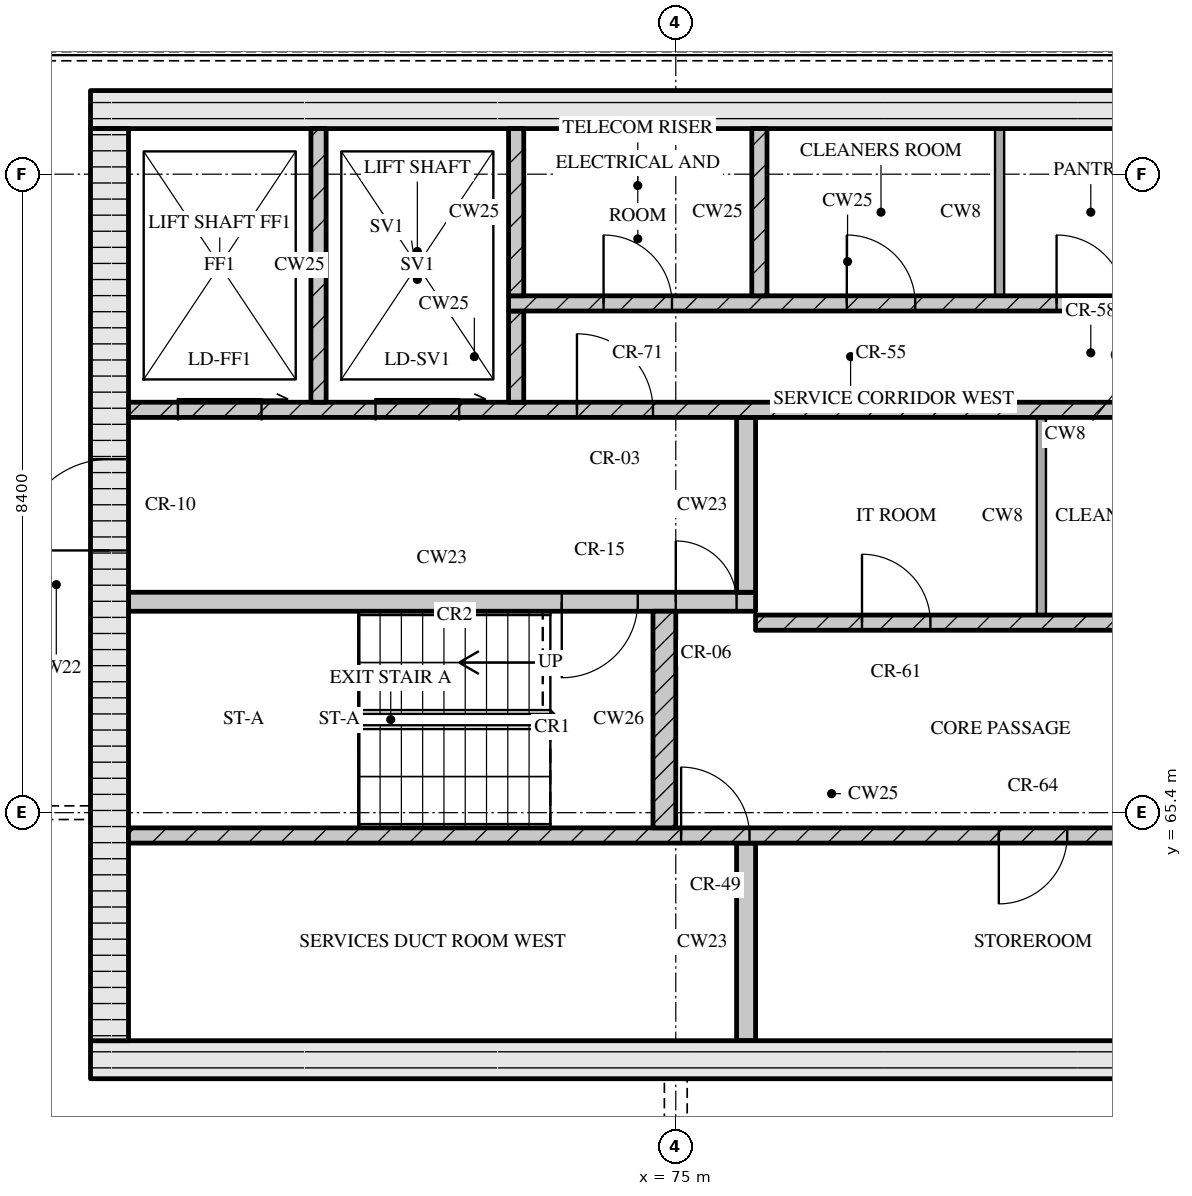
"""IFC4 building model, lengths in metres.
Left out: names, types, materials, properties, quantities, classifications, styles, units other than length and angle.
Written with IfcOpenShell. Run it as: python <this file> out.ifc"""

import sys

from ifc_helpers import new_model, si_unit, direction, frame, frame_2d, origin, place, context, subcontext, project, spatial, rectangle, extrude, element, fill, save


model = new_model("IFC4")
c1 = context("Model", 3, precision=1e-05, world=origin(), true_north=direction((0.0, 1.0)))
c2 = subcontext(c1, "Body", "Model", "MODEL_VIEW")
j1 = project(units=[si_unit("LENGTHUNIT", "METRE"), si_unit("PLANEANGLEUNIT", "RADIAN")], contexts=[c1])
p1 = place(None, origin())
s1 = spatial("IfcSite", under=j1, at=p1, CompositionType="ELEMENT")
p2 = place(p1, origin())
s2 = spatial("IfcBuilding", under=s1, at=p2, CompositionType="ELEMENT")
p3 = place(p2, frame((0.0, 0.0, 306.75)))
s3 = spatial("IfcBuildingStorey", under=s2, at=p3, CompositionType="ELEMENT", Elevation=306.75)
p4 = place(p3, frame((67.3, 62.15, 0.0), z_axis=(0.0, 0.0, 1.0), x_axis=(1.0, 0.0, 0.0)))
e1 = element("IfcWall", 1, at=p4, inside=s3, PredefinedType="SOLIDWALL", context=c2, shape_type="SweptSolid", body=[
    extrude(rectangle(XDim=40.6, YDim=0.5, at=frame_2d((20.3, 0.0))), origin(), (0.0, 0.0, 1.0), 3.3),
])
p5 = place(p4, frame((20.65, 0.0, 0.0)))
e2 = element("IfcOpeningElement", 2, at=p5, cuts=e1, PredefinedType="OPENING", context=c2, shape_type="SweptSolid", body=[
    extrude(rectangle(XDim=1.8, YDim=2.1, at=frame_2d((0.9, 1.05))), frame((0.0, 0.26, 0.0), z_axis=(0.0, -1.0, 0.0), x_axis=(1.0, 0.0, 0.0)), (0.0, 0.0, 1.0), 0.52),
])
p6 = place(p3, frame((67.3, 74.65, 0.0), z_axis=(0.0, 0.0, 1.0), x_axis=(1.0, 0.0, 0.0)))
e3 = element("IfcWall", 3, at=p6, inside=s3, PredefinedType="SOLIDWALL", context=c2, shape_type="SweptSolid", body=[
    extrude(rectangle(XDim=40.6, YDim=0.5, at=frame_2d((20.3, 0.0))), origin(), (0.0, 0.0, 1.0), 3.3),
])
p7 = place(p3, frame((67.55, 62.4, 0.0), z_axis=(0.0, 0.0, 1.0), x_axis=(0.0, 1.0, 0.0)))
e4 = element("IfcWall", 4, at=p7, inside=s3, PredefinedType="SOLIDWALL", context=c2, shape_type="SweptSolid", body=[
    extrude(rectangle(XDim=12.0, YDim=0.5, at=frame_2d((6.0, 0.0))), origin(), (0.0, 0.0, 1.0), 3.3),
])
p8 = place(p7, frame((6.45, 0.0, 0.0)))
e5 = element("IfcOpeningElement", 5, at=p8, cuts=e4, PredefinedType="OPENING", context=c2, shape_type="SweptSolid", body=[
    extrude(rectangle(XDim=1.2, YDim=2.1, at=frame_2d((0.6, 1.05))), frame((0.0, 0.26, 0.0), z_axis=(0.0, -1.0, 0.0), x_axis=(1.0, 0.0, 0.0)), (0.0, 0.0, 1.0), 0.52),
])
p9 = place(p3, frame((75.925, 62.4, 0.0), z_axis=(0.0, 0.0, 1.0), x_axis=(0.0, 1.0, 0.0)))
e6 = element("IfcWall", 6, at=p9, inside=s3, PredefinedType="SOLIDWALL", context=c2, shape_type="SweptSolid", body=[
    extrude(rectangle(XDim=2.6, YDim=0.25, at=frame_2d((1.3, 0.0))), origin(), (0.0, 0.0, 1.0), 3.3),
])
p10 = place(p3, frame((67.8, 65.1, 0.0), z_axis=(0.0, 0.0, 1.0), x_axis=(1.0, 0.0, 0.0)))
e7 = element("IfcWall", 7, at=p10, inside=s3, PredefinedType="SOLIDWALL", context=c2, shape_type="SweptSolid", body=[
    extrude(rectangle(XDim=18.5, YDim=0.2, at=frame_2d((9.25, 0.0))), origin(), (0.0, 0.0, 1.0), 3.3),
])
p11 = place(p10, frame((7.27, 0.0, 0.0)))
e8 = element("IfcOpeningElement", 8, at=p11, cuts=e7, PredefinedType="OPENING", context=c2, shape_type="SweptSolid", body=[
    extrude(rectangle(XDim=0.9, YDim=2.1, at=frame_2d((0.45, 1.05))), frame((0.0, 0.11, 0.0), z_axis=(0.0, -1.0, 0.0), x_axis=(1.0, 0.0, 0.0)), (0.0, 0.0, 1.0), 0.22),
])
p12 = place(p10, frame((11.45, 0.0, 0.0)))
e9 = element("IfcOpeningElement", 9, at=p12, cuts=e7, PredefinedType="OPENING", context=c2, shape_type="SweptSolid", body=[
    extrude(rectangle(XDim=0.9, YDim=2.1, at=frame_2d((0.45, 1.05))), frame((0.0, 0.11, 0.0), z_axis=(0.0, -1.0, 0.0), x_axis=(1.0, 0.0, 0.0)), (0.0, 0.0, 1.0), 0.22),
])
p13 = place(p10, frame((16.7, 0.0, 0.0)))
e10 = element("IfcOpeningElement", 10, at=p13, cuts=e7, PredefinedType="OPENING", context=c2, shape_type="SweptSolid", body=[
    extrude(rectangle(XDim=0.9, YDim=2.1, at=frame_2d((0.45, 1.05))), frame((0.0, 0.11, 0.0), z_axis=(0.0, -1.0, 0.0), x_axis=(1.0, 0.0, 0.0)), (0.0, 0.0, 1.0), 0.22),
])
p14 = place(p3, frame((74.85, 65.2, 0.0), z_axis=(0.0, 0.0, 1.0), x_axis=(0.0, 1.0, 0.0)))
e11 = element("IfcWall", 11, at=p14, inside=s3, PredefinedType="SOLIDWALL", context=c2, shape_type="SweptSolid", body=[
    extrude(rectangle(XDim=2.85, YDim=0.3, at=frame_2d((1.425, 0.0))), origin(), (0.0, 0.0, 1.0), 3.3),
])
p15 = place(p3, frame((76.05, 67.9, 0.0), z_axis=(0.0, 0.0, 1.0), x_axis=(1.0, 0.0, 0.0)))
e12 = element("IfcWall", 12, at=p15, inside=s3, PredefinedType="SOLIDWALL", context=c2, shape_type="SweptSolid", body=[
    extrude(rectangle(XDim=23.1, YDim=0.2, at=frame_2d((11.55, 0.0))), origin(), (0.0, 0.0, 1.0), 3.3),
])
p16 = place(p15, frame((1.4, 0.0, 0.0)))
e13 = element("IfcOpeningElement", 13, at=p16, cuts=e12, PredefinedType="OPENING", context=c2, shape_type="SweptSolid", body=[
    extrude(rectangle(XDim=0.9, YDim=2.1, at=frame_2d((0.45, 1.05))), frame((0.0, 0.11, 0.0), z_axis=(0.0, -1.0, 0.0), x_axis=(1.0, 0.0, 0.0)), (0.0, 0.0, 1.0), 0.22),
])
p17 = place(p15, frame((5.11, 0.0, 0.0)))
e14 = element("IfcOpeningElement", 14, at=p17, cuts=e12, PredefinedType="OPENING", context=c2, shape_type="SweptSolid", body=[
    extrude(rectangle(XDim=0.9, YDim=2.1, at=frame_2d((0.45, 1.05))), frame((0.0, 0.11, 0.0), z_axis=(0.0, -1.0, 0.0), x_axis=(1.0, 0.0, 0.0)), (0.0, 0.0, 1.0), 0.22),
])
p18 = place(p15, frame((8.45, 0.0, 0.0)))
e15 = element("IfcOpeningElement", 15, at=p18, cuts=e12, PredefinedType="OPENING", context=c2, shape_type="SweptSolid", body=[
    extrude(rectangle(XDim=0.9, YDim=2.1, at=frame_2d((0.45, 1.05))), frame((0.0, 0.11, 0.0), z_axis=(0.0, -1.0, 0.0), x_axis=(1.0, 0.0, 0.0)), (0.0, 0.0, 1.0), 0.22),
])
p19 = place(p15, frame((10.91, 0.0, 0.0)))
e16 = element("IfcOpeningElement", 16, at=p19, cuts=e12, PredefinedType="OPENING", context=c2, shape_type="SweptSolid", body=[
    extrude(rectangle(XDim=0.9, YDim=2.1, at=frame_2d((0.45, 1.05))), frame((0.0, 0.11, 0.0), z_axis=(0.0, -1.0, 0.0), x_axis=(1.0, 0.0, 0.0)), (0.0, 0.0, 1.0), 0.22),
])
p20 = place(p15, frame((13.55, 0.0, 0.0)))
e17 = element("IfcOpeningElement", 17, at=p20, cuts=e12, PredefinedType="OPENING", context=c2, shape_type="SweptSolid", body=[
    extrude(rectangle(XDim=1.0, YDim=2.1, at=frame_2d((0.5, 1.05))), frame((0.0, 0.11, 0.0), z_axis=(0.0, -1.0, 0.0), x_axis=(1.0, 0.0, 0.0)), (0.0, 0.0, 1.0), 0.22),
])
p21 = place(p15, frame((16.2, 0.0, 0.0)))
e18 = element("IfcOpeningElement", 18, at=p21, cuts=e12, PredefinedType="OPENING", context=c2, shape_type="SweptSolid", body=[
    extrude(rectangle(XDim=1.1, YDim=2.1, at=frame_2d((0.55, 1.05))), frame((0.0, 0.11, 0.0), z_axis=(0.0, -1.0, 0.0), x_axis=(1.0, 0.0, 0.0)), (0.0, 0.0, 1.0), 0.22),
])
p22 = place(p15, frame((18.7, 0.0, 0.0)))
e19 = element("IfcOpeningElement", 19, at=p22, cuts=e12, PredefinedType="OPENING", context=c2, shape_type="SweptSolid", body=[
    extrude(rectangle(XDim=1.1, YDim=2.1, at=frame_2d((0.55, 1.05))), frame((0.0, 0.11, 0.0), z_axis=(0.0, -1.0, 0.0), x_axis=(1.0, 0.0, 0.0)), (0.0, 0.0, 1.0), 0.22),
])
p23 = place(p15, frame((21.2, 0.0, 0.0)))
e20 = element("IfcOpeningElement", 20, at=p23, cuts=e12, PredefinedType="OPENING", context=c2, shape_type="SweptSolid", body=[
    extrude(rectangle(XDim=1.1, YDim=2.1, at=frame_2d((0.55, 1.05))), frame((0.0, 0.11, 0.0), z_axis=(0.0, -1.0, 0.0), x_axis=(1.0, 0.0, 0.0)), (0.0, 0.0, 1.0), 0.22),
])
p24 = place(p3, frame((79.81, 68.0, 0.0), z_axis=(0.0, 0.0, 1.0), x_axis=(0.0, 1.0, 0.0)))
e21 = element("IfcWall", 21, at=p24, inside=s3, PredefinedType="PARTITIONING", context=c2, shape_type="SweptSolid", body=[
    extrude(rectangle(XDim=2.6, YDim=0.12, at=frame_2d((1.3, 0.0))), origin(), (0.0, 0.0, 1.0), 3.3),
])
p25 = place(p3, frame((67.8, 68.175, 0.0), z_axis=(0.0, 0.0, 1.0), x_axis=(1.0, 0.0, 0.0)))
e22 = element("IfcWall", 22, at=p25, inside=s3, PredefinedType="SOLIDWALL", context=c2, shape_type="SweptSolid", body=[
    extrude(rectangle(XDim=8.25, YDim=0.25, at=frame_2d((4.125, 0.0))), origin(), (0.0, 0.0, 1.0), 3.3),
])
p26 = place(p25, frame((5.7, 0.0, 0.0)))
e23 = element("IfcOpeningElement", 23, at=p26, cuts=e22, PredefinedType="OPENING", context=c2, shape_type="SweptSolid", body=[
    extrude(rectangle(XDim=1.0, YDim=2.1, at=frame_2d((0.5, 1.05))), frame((0.0, 0.135, 0.0), z_axis=(0.0, -1.0, 0.0), x_axis=(1.0, 0.0, 0.0)), (0.0, 0.0, 1.0), 0.27),
])
p27 = place(p25, frame((7.2, 0.0, 0.0)))
e24 = element("IfcOpeningElement", 24, at=p27, cuts=e22, PredefinedType="OPENING", context=c2, shape_type="SweptSolid", body=[
    extrude(rectangle(XDim=0.8, YDim=2.1, at=frame_2d((0.4, 1.05))), frame((0.0, 0.135, 0.0), z_axis=(0.0, -1.0, 0.0), x_axis=(1.0, 0.0, 0.0)), (0.0, 0.0, 1.0), 0.27),
])
p28 = place(p3, frame((75.925, 68.3, 0.0), z_axis=(0.0, 0.0, 1.0), x_axis=(0.0, 1.0, 0.0)))
e25 = element("IfcWall", 25, at=p28, inside=s3, PredefinedType="SOLIDWALL", context=c2, shape_type="SweptSolid", body=[
    extrude(rectangle(XDim=2.3, YDim=0.25, at=frame_2d((1.15, 0.0))), origin(), (0.0, 0.0, 1.0), 3.3),
])
p29 = place(p3, frame((67.8, 70.7, 0.0), z_axis=(0.0, 0.0, 1.0), x_axis=(1.0, 0.0, 0.0)))
e26 = element("IfcWall", 26, at=p29, inside=s3, PredefinedType="SOLIDWALL", context=c2, shape_type="SweptSolid", body=[
    extrude(rectangle(XDim=39.6, YDim=0.2, at=frame_2d((19.8, 0.0))), origin(), (0.0, 0.0, 1.0), 3.3),
])
p30 = place(p29, frame((0.65, 0.0, 0.0)))
e27 = element("IfcOpeningElement", 27, at=p30, cuts=e26, PredefinedType="OPENING", context=c2, shape_type="SweptSolid", body=[
    extrude(rectangle(XDim=1.1, YDim=2.1, at=frame_2d((0.55, 1.05))), frame((0.0, 0.11, 0.0), z_axis=(0.0, -1.0, 0.0), x_axis=(1.0, 0.0, 0.0)), (0.0, 0.0, 1.0), 0.22),
])
p31 = place(p29, frame((3.25, 0.0, 0.0)))
e28 = element("IfcOpeningElement", 28, at=p31, cuts=e26, PredefinedType="OPENING", context=c2, shape_type="SweptSolid", body=[
    extrude(rectangle(XDim=1.1, YDim=2.1, at=frame_2d((0.55, 1.05))), frame((0.0, 0.11, 0.0), z_axis=(0.0, -1.0, 0.0), x_axis=(1.0, 0.0, 0.0)), (0.0, 0.0, 1.0), 0.22),
])
p32 = place(p29, frame((5.9, 0.0, 0.0)))
e29 = element("IfcOpeningElement", 29, at=p32, cuts=e26, PredefinedType="OPENING", context=c2, shape_type="SweptSolid", body=[
    extrude(rectangle(XDim=1.0, YDim=2.1, at=frame_2d((0.5, 1.05))), frame((0.0, 0.11, 0.0), z_axis=(0.0, -1.0, 0.0), x_axis=(1.0, 0.0, 0.0)), (0.0, 0.0, 1.0), 0.22),
])
p33 = place(p29, frame((21.7, 0.0, 0.0)))
e30 = element("IfcOpeningElement", 30, at=p33, cuts=e26, PredefinedType="OPENING", context=c2, shape_type="SweptSolid", body=[
    extrude(rectangle(XDim=1.0, YDim=2.1, at=frame_2d((0.5, 1.05))), frame((0.0, 0.11, 0.0), z_axis=(0.0, -1.0, 0.0), x_axis=(1.0, 0.0, 0.0)), (0.0, 0.0, 1.0), 0.22),
])
p34 = place(p29, frame((32.7, 0.0, 0.0)))
e31 = element("IfcOpeningElement", 31, at=p34, cuts=e26, PredefinedType="OPENING", context=c2, shape_type="SweptSolid", body=[
    extrude(rectangle(XDim=1.0, YDim=2.1, at=frame_2d((0.5, 1.05))), frame((0.0, 0.11, 0.0), z_axis=(0.0, -1.0, 0.0), x_axis=(1.0, 0.0, 0.0)), (0.0, 0.0, 1.0), 0.22),
])
p35 = place(p29, frame((35.25, 0.0, 0.0)))
e32 = element("IfcOpeningElement", 32, at=p35, cuts=e26, PredefinedType="OPENING", context=c2, shape_type="SweptSolid", body=[
    extrude(rectangle(XDim=1.1, YDim=2.1, at=frame_2d((0.55, 1.05))), frame((0.0, 0.11, 0.0), z_axis=(0.0, -1.0, 0.0), x_axis=(1.0, 0.0, 0.0)), (0.0, 0.0, 1.0), 0.22),
])
p36 = place(p29, frame((37.85, 0.0, 0.0)))
e33 = element("IfcOpeningElement", 33, at=p36, cuts=e26, PredefinedType="OPENING", context=c2, shape_type="SweptSolid", body=[
    extrude(rectangle(XDim=1.1, YDim=2.1, at=frame_2d((0.55, 1.05))), frame((0.0, 0.11, 0.0), z_axis=(0.0, -1.0, 0.0), x_axis=(1.0, 0.0, 0.0)), (0.0, 0.0, 1.0), 0.22),
])
p37 = place(p3, frame((70.3, 70.8, 0.0), z_axis=(0.0, 0.0, 1.0), x_axis=(0.0, 1.0, 0.0)))
e34 = element("IfcWall", 34, at=p37, inside=s3, PredefinedType="SOLIDWALL", context=c2, shape_type="SweptSolid", body=[
    extrude(rectangle(XDim=3.6, YDim=0.2, at=frame_2d((1.8, 0.0))), origin(), (0.0, 0.0, 1.0), 3.3),
])
p38 = place(p3, frame((72.9, 70.8, 0.0), z_axis=(0.0, 0.0, 1.0), x_axis=(0.0, 1.0, 0.0)))
e35 = element("IfcWall", 35, at=p38, inside=s3, PredefinedType="SOLIDWALL", context=c2, shape_type="SweptSolid", body=[
    extrude(rectangle(XDim=1.2, YDim=0.2, at=frame_2d((0.6, 0.0))), origin(), (0.0, 0.0, 1.0), 3.3),
])
p39 = place(p3, frame((72.8, 72.1, 0.0), z_axis=(0.0, 0.0, 1.0), x_axis=(1.0, 0.0, 0.0)))
e36 = element("IfcWall", 36, at=p39, inside=s3, PredefinedType="SOLIDWALL", context=c2, shape_type="SweptSolid", body=[
    extrude(rectangle(XDim=8.92, YDim=0.2, at=frame_2d((4.46, 0.0))), origin(), (0.0, 0.0, 1.0), 3.3),
])
p40 = place(p39, frame((1.25, 0.0, 0.0)))
e37 = element("IfcOpeningElement", 37, at=p40, cuts=e36, PredefinedType="OPENING", context=c2, shape_type="SweptSolid", body=[
    extrude(rectangle(XDim=0.9, YDim=2.1, at=frame_2d((0.45, 1.05))), frame((0.0, 0.11, 0.0), z_axis=(0.0, -1.0, 0.0), x_axis=(1.0, 0.0, 0.0)), (0.0, 0.0, 1.0), 0.22),
])
p41 = place(p39, frame((4.45, 0.0, 0.0)))
e38 = element("IfcOpeningElement", 38, at=p41, cuts=e36, PredefinedType="OPENING", context=c2, shape_type="SweptSolid", body=[
    extrude(rectangle(XDim=0.9, YDim=2.1, at=frame_2d((0.45, 1.05))), frame((0.0, 0.11, 0.0), z_axis=(0.0, -1.0, 0.0), x_axis=(1.0, 0.0, 0.0)), (0.0, 0.0, 1.0), 0.22),
])
p42 = place(p39, frame((7.21, 0.0, 0.0)))
e39 = element("IfcOpeningElement", 39, at=p42, cuts=e36, PredefinedType="OPENING", context=c2, shape_type="SweptSolid", body=[
    extrude(rectangle(XDim=0.9, YDim=2.1, at=frame_2d((0.45, 1.05))), frame((0.0, 0.11, 0.0), z_axis=(0.0, -1.0, 0.0), x_axis=(1.0, 0.0, 0.0)), (0.0, 0.0, 1.0), 0.22),
])
for number, where, z_axis, x_axis in (
    (40, (72.9, 72.2, 0.0), (0.0, 0.0, 1.0), (0.0, 1.0, 0.0)),
    (41, (76.1, 72.2, 0.0), (0.0, 0.0, 1.0), (0.0, 1.0, 0.0)),
):
    element("IfcWall", number, at=place(p3, frame(where, z_axis=z_axis, x_axis=x_axis)), inside=s3, PredefinedType="SOLIDWALL", context=c2, shape_type="SweptSolid", body=[
        extrude(rectangle(XDim=2.2, YDim=0.2, at=frame_2d((1.1, 0.0))), origin(), (0.0, 0.0, 1.0), 3.3),
    ])
p43 = place(p3, frame((79.26, 72.2, 0.0), z_axis=(0.0, 0.0, 1.0), x_axis=(0.0, 1.0, 0.0)))
e42 = element("IfcWall", 42, at=p43, inside=s3, PredefinedType="PARTITIONING", context=c2, shape_type="SweptSolid", body=[
    extrude(rectangle(XDim=2.2, YDim=0.12, at=frame_2d((1.1, 0.0))), origin(), (0.0, 0.0, 1.0), 3.3),
])
p44 = place(p11, origin())
e43 = element("IfcDoor", 43, at=p44, inside=s3, OperationType="SINGLE_SWING_LEFT", PredefinedType="DOOR", context=c2, shape_type="SweptSolid", body=[
    extrude(rectangle(XDim=0.9, YDim=2.1, at=frame_2d((0.45, 1.05))), frame((0.0, 0.025, 0.0), z_axis=(0.0, -1.0, 0.0), x_axis=(1.0, 0.0, 0.0)), (0.0, 0.0, 1.0), 0.05),
])
fill(e8, e43)
p45 = place(p12, origin())
e44 = element("IfcDoor", 44, at=p45, inside=s3, OperationType="SINGLE_SWING_RIGHT", PredefinedType="DOOR", context=c2, shape_type="SweptSolid", body=[
    extrude(rectangle(XDim=0.9, YDim=2.1, at=frame_2d((0.45, 1.05))), frame((0.0, 0.025, 0.0), z_axis=(0.0, -1.0, 0.0), x_axis=(1.0, 0.0, 0.0)), (0.0, 0.0, 1.0), 0.05),
])
fill(e9, e44)
p46 = place(p16, origin())
e45 = element("IfcDoor", 45, at=p46, inside=s3, OperationType="SINGLE_SWING_LEFT", PredefinedType="DOOR", context=c2, shape_type="SweptSolid", body=[
    extrude(rectangle(XDim=0.9, YDim=2.1, at=frame_2d((0.45, 1.05))), frame((0.0, 0.025, 0.0), z_axis=(0.0, -1.0, 0.0), x_axis=(1.0, 0.0, 0.0)), (0.0, 0.0, 1.0), 0.05),
])
fill(e13, e45)
p47 = place(p26, origin())
e46 = element("IfcDoor", 46, at=p47, inside=s3, OperationType="SINGLE_SWING_RIGHT", PredefinedType="DOOR", context=c2, shape_type="SweptSolid", body=[
    extrude(rectangle(XDim=1.0, YDim=2.1, at=frame_2d((0.5, 1.05))), frame((0.0, 0.025, 0.0), z_axis=(0.0, -1.0, 0.0), x_axis=(1.0, 0.0, 0.0)), (0.0, 0.0, 1.0), 0.05),
])
fill(e23, e46)
p48 = place(p27, origin())
e47 = element("IfcDoor", 47, at=p48, inside=s3, OperationType="SINGLE_SWING_LEFT", PredefinedType="DOOR", context=c2, shape_type="SweptSolid", body=[
    extrude(rectangle(XDim=0.8, YDim=2.1, at=frame_2d((0.4, 1.05))), frame((0.0, 0.025, 0.0), z_axis=(0.0, -1.0, 0.0), x_axis=(1.0, 0.0, 0.0)), (0.0, 0.0, 1.0), 0.05),
])
fill(e24, e47)
p49 = place(p8, origin())
e48 = element("IfcDoor", 48, at=p49, inside=s3, OperationType="SINGLE_SWING_LEFT", PredefinedType="DOOR", context=c2, shape_type="SweptSolid", body=[
    extrude(rectangle(XDim=1.2, YDim=2.1, at=frame_2d((0.6, 1.05))), frame((0.0, 0.025, 0.0), z_axis=(0.0, -1.0, 0.0), x_axis=(1.0, 0.0, 0.0)), (0.0, 0.0, 1.0), 0.05),
])
fill(e5, e48)
p50 = place(p30, origin())
e49 = element("IfcDoor", 49, at=p50, inside=s3, OperationType="SLIDING_TO_RIGHT", PredefinedType="DOOR", context=c2, shape_type="SweptSolid", body=[
    extrude(rectangle(XDim=1.1, YDim=2.1, at=frame_2d((0.55, 1.05))), frame((0.0, 0.025, 0.0), z_axis=(0.0, -1.0, 0.0), x_axis=(1.0, 0.0, 0.0)), (0.0, 0.0, 1.0), 0.05),
])
fill(e27, e49)
p51 = place(p31, origin())
e50 = element("IfcDoor", 50, at=p51, inside=s3, OperationType="SLIDING_TO_RIGHT", PredefinedType="DOOR", context=c2, shape_type="SweptSolid", body=[
    extrude(rectangle(XDim=1.1, YDim=2.1, at=frame_2d((0.55, 1.05))), frame((0.0, 0.025, 0.0), z_axis=(0.0, -1.0, 0.0), x_axis=(1.0, 0.0, 0.0)), (0.0, 0.0, 1.0), 0.05),
])
fill(e28, e50)
p52 = place(p32, origin())
e51 = element("IfcDoor", 51, at=p52, inside=s3, OperationType="SINGLE_SWING_LEFT", PredefinedType="DOOR", context=c2, shape_type="SweptSolid", body=[
    extrude(rectangle(XDim=1.0, YDim=2.1, at=frame_2d((0.5, 1.05))), frame((0.0, 0.025, 0.0), z_axis=(0.0, -1.0, 0.0), x_axis=(1.0, 0.0, 0.0)), (0.0, 0.0, 1.0), 0.05),
])
fill(e29, e51)
p53 = place(p40, origin())
e52 = element("IfcDoor", 52, at=p53, inside=s3, OperationType="SINGLE_SWING_LEFT", PredefinedType="DOOR", context=c2, shape_type="SweptSolid", body=[
    extrude(rectangle(XDim=0.9, YDim=2.1, at=frame_2d((0.45, 1.05))), frame((0.0, 0.025, 0.0), z_axis=(0.0, -1.0, 0.0), x_axis=(1.0, 0.0, 0.0)), (0.0, 0.0, 1.0), 0.05),
])
fill(e37, e52)
p54 = place(p41, origin())
e53 = element("IfcDoor", 53, at=p54, inside=s3, OperationType="SINGLE_SWING_LEFT", PredefinedType="DOOR", context=c2, shape_type="SweptSolid", body=[
    extrude(rectangle(XDim=0.9, YDim=2.1, at=frame_2d((0.45, 1.05))), frame((0.0, 0.025, 0.0), z_axis=(0.0, -1.0, 0.0), x_axis=(1.0, 0.0, 0.0)), (0.0, 0.0, 1.0), 0.05),
])
fill(e38, e53)
p55 = place(p42, origin())
e54 = element("IfcDoor", 54, at=p55, inside=s3, OperationType="SINGLE_SWING_LEFT", PredefinedType="DOOR", context=c2, shape_type="SweptSolid", body=[
    extrude(rectangle(XDim=0.9, YDim=2.1, at=frame_2d((0.45, 1.05))), frame((0.0, 0.025, 0.0), z_axis=(0.0, -1.0, 0.0), x_axis=(1.0, 0.0, 0.0)), (0.0, 0.0, 1.0), 0.05),
])
fill(e39, e54)
save(model, sys.argv[1])
